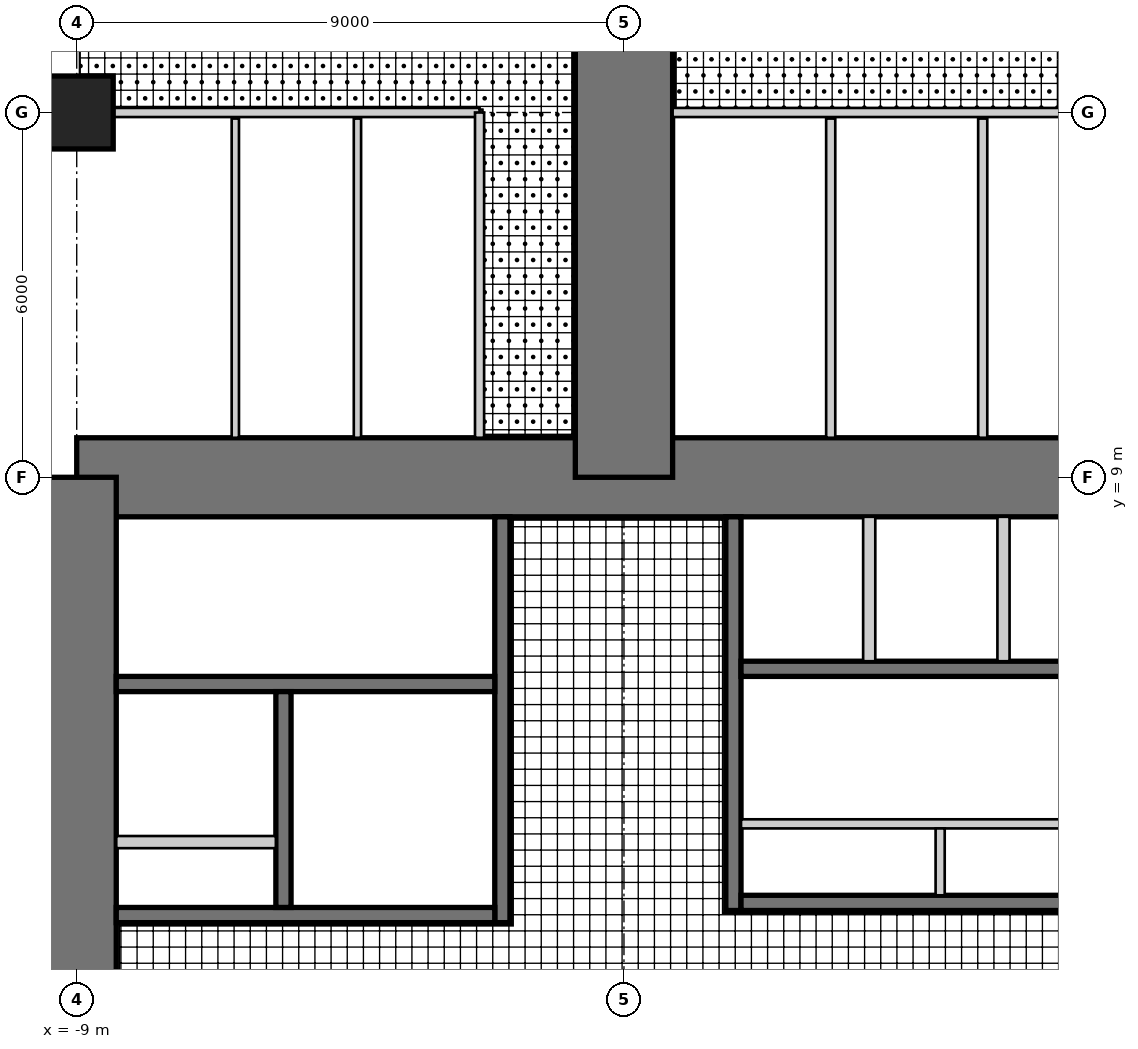
"""IFC4 building model, lengths in metres.
Left out: names, types, materials, properties, quantities, classifications, styles, units other than length and angle.
Written with IfcOpenShell. Run it as: python <this file> out.ifc"""

import sys

from ifc_helpers import new_model, si_unit, direction, frame, frame_2d, origin, origin_2d, place, context, subcontext, project, spatial, rectangle, extrude, element, fill, save


model = new_model("IFC4")
c1 = context("Model", 3, precision=1e-05, world=origin(), true_north=direction((0.0, 1.0)))
c2 = subcontext(c1, "Body", "Model", "MODEL_VIEW")
j1 = project(units=[si_unit("LENGTHUNIT", "METRE"), si_unit("PLANEANGLEUNIT", "RADIAN")], contexts=[c1])
p1 = place(None, origin())
s1 = spatial("IfcSite", under=j1, at=p1, CompositionType="ELEMENT")
p2 = place(p1, origin())
s2 = spatial("IfcBuilding", under=s1, at=p2, CompositionType="ELEMENT")
p3 = place(p2, frame((0.0, 0.0, 71.5)))
s3 = spatial("IfcBuildingStorey", under=s2, at=p3, CompositionType="ELEMENT", Elevation=71.5)
p4 = place(p3, frame((9.0, 9.0, 0.0), z_axis=(0.0, 0.0, 1.0), x_axis=(-1.0, 0.0, 0.0)))
e1 = element("IfcWall", 1, at=p4, inside=s3, PredefinedType="SHEAR", context=c2, shape_type="SweptSolid", body=[
    extrude(rectangle(XDim=18.0, YDim=1.3, at=frame_2d((9.0, 0.0))), origin(), (0.0, 0.0, 1.0), 4.0),
])
p5 = place(p4, frame((9.8, 0.0, 0.0)))
e2 = element("IfcOpeningElement", 2, at=p5, cuts=e1, PredefinedType="OPENING", context=c2, shape_type="SweptSolid", body=[
    extrude(rectangle(XDim=1.0, YDim=2.4, at=frame_2d((0.5, 1.2))), frame((0.0, 0.66, 0.0), z_axis=(0.0, -1.0, 0.0), x_axis=(1.0, 0.0, 0.0)), (0.0, 0.0, 1.0), 1.32),
])
p6 = place(p3, frame((-9.0, 9.0, 0.0), z_axis=(0.0, 0.0, 1.0), x_axis=(0.0, -1.0, 0.0)))
e3 = element("IfcWall", 3, at=p6, inside=s3, PredefinedType="SHEAR", context=c2, shape_type="SweptSolid", body=[
    extrude(rectangle(XDim=18.0, YDim=1.3, at=frame_2d((9.0, 0.0))), origin(), (0.0, 0.0, 1.0), 4.0),
])
p7 = place(p6, frame((9.8, 0.0, 0.0)))
e4 = element("IfcOpeningElement", 4, at=p7, cuts=e3, PredefinedType="OPENING", context=c2, shape_type="SweptSolid", body=[
    extrude(rectangle(XDim=1.0, YDim=2.4, at=frame_2d((0.5, 1.2))), frame((0.0, 0.66, 0.0), z_axis=(0.0, -1.0, 0.0), x_axis=(1.0, 0.0, 0.0)), (0.0, 0.0, 1.0), 1.32),
])
p8 = place(p3, frame((1.8, 1.875, 0.0), z_axis=(0.0, 0.0, 1.0), x_axis=(0.0, 1.0, 0.0)))
e5 = element("IfcWall", 5, at=p8, inside=s3, PredefinedType="SHEAR", context=c2, shape_type="SweptSolid", body=[
    extrude(rectangle(XDim=6.475, YDim=0.25, at=frame_2d((3.238, 0.0))), origin(), (0.0, 0.0, 1.0), 4.0),
])
p9 = place(p8, frame((1.875, 0.0, 0.0)))
e6 = element("IfcOpeningElement", 6, at=p9, cuts=e5, PredefinedType="OPENING", context=c2, shape_type="SweptSolid", body=[
    extrude(rectangle(XDim=1.6, YDim=2.4, at=frame_2d((0.8, 1.2))), frame((0.0, 0.135, 0.0), z_axis=(0.0, -1.0, 0.0), x_axis=(1.0, 0.0, 0.0)), (0.0, 0.0, 1.0), 0.27),
])
p10 = place(p3, frame((1.925, 2.0, 0.0), z_axis=(0.0, 0.0, 1.0), x_axis=(1.0, 0.0, 0.0)))
e7 = element("IfcWall", 7, at=p10, inside=s3, PredefinedType="SHEAR", context=c2, shape_type="SweptSolid", body=[
    extrude(rectangle(XDim=6.425, YDim=0.25, at=frame_2d((3.212, 0.0))), origin(), (0.0, 0.0, 1.0), 4.0),
])
p11 = place(p3, frame((1.925, 5.85, 0.0), z_axis=(0.0, 0.0, 1.0), x_axis=(1.0, 0.0, 0.0)))
e8 = element("IfcWall", 8, at=p11, inside=s3, PredefinedType="SHEAR", context=c2, shape_type="SweptSolid", body=[
    extrude(rectangle(XDim=6.425, YDim=0.25, at=frame_2d((3.212, 0.0))), origin(), (0.0, 0.0, 1.0), 4.0),
])
p12 = place(p11, frame((0.454, 0.0, 0.0)))
e9 = element("IfcOpeningElement", 9, at=p12, cuts=e8, PredefinedType="OPENING", context=c2, shape_type="SweptSolid", body=[
    extrude(rectangle(XDim=1.1, YDim=2.2, at=frame_2d((0.55, 1.1))), frame((0.0, 0.135, 0.0), z_axis=(0.0, -1.0, 0.0), x_axis=(1.0, 0.0, 0.0)), (0.0, 0.0, 1.0), 0.27),
])
p13 = place(p11, frame((2.663, 0.0, 0.0)))
e10 = element("IfcOpeningElement", 10, at=p13, cuts=e8, PredefinedType="OPENING", context=c2, shape_type="SweptSolid", body=[
    extrude(rectangle(XDim=1.1, YDim=2.2, at=frame_2d((0.55, 1.1))), frame((0.0, 0.135, 0.0), z_axis=(0.0, -1.0, 0.0), x_axis=(1.0, 0.0, 0.0)), (0.0, 0.0, 1.0), 0.27),
])
p14 = place(p11, frame((4.871, 0.0, 0.0)))
e11 = element("IfcOpeningElement", 11, at=p14, cuts=e8, PredefinedType="OPENING", context=c2, shape_type="SweptSolid", body=[
    extrude(rectangle(XDim=1.1, YDim=2.2, at=frame_2d((0.55, 1.1))), frame((0.0, 0.135, 0.0), z_axis=(0.0, -1.0, 0.0), x_axis=(1.0, 0.0, 0.0)), (0.0, 0.0, 1.0), 0.27),
])
p15 = place(p3, frame((1.925, 3.3, 0.0), z_axis=(0.0, 0.0, 1.0), x_axis=(1.0, 0.0, 0.0)))
e12 = element("IfcWall", 12, at=p15, inside=s3, PredefinedType="PARTITIONING", context=c2, shape_type="SweptSolid", body=[
    extrude(rectangle(XDim=6.425, YDim=0.15, at=frame_2d((3.212, 0.0))), origin(), (0.0, 0.0, 1.0), 4.0),
])
p16 = place(p15, frame((0.075, 0.0, 0.0)))
e13 = element("IfcOpeningElement", 13, at=p16, cuts=e12, PredefinedType="OPENING", context=c2, shape_type="SweptSolid", body=[
    extrude(rectangle(XDim=0.8, YDim=2.1, at=frame_2d((0.4, 1.05))), frame((0.0, 0.085, 0.0), z_axis=(0.0, -1.0, 0.0), x_axis=(1.0, 0.0, 0.0)), (0.0, 0.0, 1.0), 0.17),
])
p17 = place(p15, frame((3.675, 0.0, 0.0)))
e14 = element("IfcOpeningElement", 14, at=p17, cuts=e12, PredefinedType="OPENING", context=c2, shape_type="SweptSolid", body=[
    extrude(rectangle(XDim=0.8, YDim=2.1, at=frame_2d((0.4, 1.05))), frame((0.0, 0.085, 0.0), z_axis=(0.0, -1.0, 0.0), x_axis=(1.0, 0.0, 0.0)), (0.0, 0.0, 1.0), 0.17),
])
p18 = place(p3, frame((5.2, 2.125, 0.0), z_axis=(0.0, 0.0, 1.0), x_axis=(0.0, 1.0, 0.0)))
e15 = element("IfcWall", 15, at=p18, inside=s3, PredefinedType="PARTITIONING", context=c2, shape_type="SweptSolid", body=[
    extrude(rectangle(XDim=1.1, YDim=0.15, at=frame_2d((0.55, 0.0))), origin(), (0.0, 0.0, 1.0), 4.0),
])
for number, where, z_axis, x_axis in (
    (16, (4.033, 5.975, 0.0), (0.0, 0.0, 1.0), (0.0, 1.0, 0.0)),
    (17, (6.242, 5.975, 0.0), (0.0, 0.0, 1.0), (0.0, 1.0, 0.0)),
):
    element("IfcWall", number, at=place(p3, frame(where, z_axis=z_axis, x_axis=x_axis)), inside=s3, PredefinedType="PARTITIONING", context=c2, shape_type="SweptSolid", body=[
        extrude(rectangle(XDim=2.375, YDim=0.2, at=frame_2d((1.188, 0.0))), origin(), (0.0, 0.0, 1.0), 4.0),
    ])
p19 = place(p3, frame((-2.0, 1.675, 0.0), z_axis=(0.0, 0.0, 1.0), x_axis=(0.0, 1.0, 0.0)))
e18 = element("IfcWall", 18, at=p19, inside=s3, PredefinedType="SHEAR", context=c2, shape_type="SweptSolid", body=[
    extrude(rectangle(XDim=6.675, YDim=0.25, at=frame_2d((3.337, 0.0))), origin(), (0.0, 0.0, 1.0), 4.0),
])
p20 = place(p19, frame((0.725, 0.0, 0.0)))
e19 = element("IfcOpeningElement", 19, at=p20, cuts=e18, PredefinedType="OPENING", context=c2, shape_type="SweptSolid", body=[
    extrude(rectangle(XDim=1.0, YDim=2.1, at=frame_2d((0.5, 1.05))), frame((0.0, 0.135, 0.0), z_axis=(0.0, -1.0, 0.0), x_axis=(1.0, 0.0, 0.0)), (0.0, 0.0, 1.0), 0.27),
])
p21 = place(p3, frame((-2.125, 1.8, 0.0), z_axis=(0.0, 0.0, 1.0), x_axis=(-1.0, 0.0, 0.0)))
e20 = element("IfcWall", 20, at=p21, inside=s3, PredefinedType="SHEAR", context=c2, shape_type="SweptSolid", body=[
    extrude(rectangle(XDim=6.225, YDim=0.25, at=frame_2d((3.113, 0.0))), origin(), (0.0, 0.0, 1.0), 4.0),
])
p22 = place(p3, frame((-2.125, 5.6, 0.0), z_axis=(0.0, 0.0, 1.0), x_axis=(-1.0, 0.0, 0.0)))
e21 = element("IfcWall", 21, at=p22, inside=s3, PredefinedType="SHEAR", context=c2, shape_type="SweptSolid", body=[
    extrude(rectangle(XDim=6.225, YDim=0.25, at=frame_2d((3.113, 0.0))), origin(), (0.0, 0.0, 1.0), 4.0),
])
p23 = place(p22, frame((0.175, 0.0, 0.0)))
e22 = element("IfcOpeningElement", 22, at=p23, cuts=e21, PredefinedType="OPENING", context=c2, shape_type="SweptSolid", body=[
    extrude(rectangle(XDim=1.0, YDim=2.1, at=frame_2d((0.5, 1.05))), frame((0.0, 0.135, 0.0), z_axis=(0.0, -1.0, 0.0), x_axis=(1.0, 0.0, 0.0)), (0.0, 0.0, 1.0), 0.27),
])
p24 = place(p3, frame((-5.6, 1.925, 0.0), z_axis=(0.0, 0.0, 1.0), x_axis=(0.0, 1.0, 0.0)))
e23 = element("IfcWall", 23, at=p24, inside=s3, PredefinedType="SHEAR", context=c2, shape_type="SweptSolid", body=[
    extrude(rectangle(XDim=3.55, YDim=0.25, at=frame_2d((1.775, 0.0))), origin(), (0.0, 0.0, 1.0), 4.0),
])
p25 = place(p24, frame((1.525, 0.0, 0.0)))
e24 = element("IfcOpeningElement", 24, at=p25, cuts=e23, PredefinedType="OPENING", context=c2, shape_type="SweptSolid", body=[
    extrude(rectangle(XDim=1.1, YDim=2.2, at=frame_2d((0.55, 1.1))), frame((0.0, 0.135, 0.0), z_axis=(0.0, -1.0, 0.0), x_axis=(1.0, 0.0, 0.0)), (0.0, 0.0, 1.0), 0.27),
])
p26 = place(p24, frame((0.075, 0.0, 0.0)))
e25 = element("IfcOpeningElement", 25, at=p26, cuts=e23, PredefinedType="OPENING", context=c2, shape_type="SweptSolid", body=[
    extrude(rectangle(XDim=0.8, YDim=2.1, at=frame_2d((0.4, 1.05))), frame((0.0, 0.135, 0.0), z_axis=(0.0, -1.0, 0.0), x_axis=(1.0, 0.0, 0.0)), (0.0, 0.0, 1.0), 0.27),
])
p27 = place(p3, frame((-5.725, 3.0, 0.0), z_axis=(0.0, 0.0, 1.0), x_axis=(-1.0, 0.0, 0.0)))
e26 = element("IfcWall", 26, at=p27, inside=s3, PredefinedType="PARTITIONING", context=c2, shape_type="SweptSolid", body=[
    extrude(rectangle(XDim=2.625, YDim=0.2, at=frame_2d((1.312, 0.0))), origin(), (0.0, 0.0, 1.0), 4.0),
])
p28 = place(p3, frame((0.0, 9.0, 0.0), z_axis=(0.0, 0.0, 1.0), x_axis=(0.0, 1.0, 0.0)))
e27 = element("IfcWall", 27, at=p28, inside=s3, PredefinedType="SHEAR", context=c2, shape_type="SweptSolid", body=[
    extrude(rectangle(XDim=9.0, YDim=1.6, at=frame_2d((4.5, 0.0))), origin(), (0.0, 0.0, 1.0), 4.0),
])
p29 = place(p3, frame((-9.0, 15.0, 0.0), z_axis=(0.0, 0.0, 1.0), x_axis=(1.0, 0.0, 0.0)))
e28 = element("IfcColumn", 28, at=p29, inside=s3, PredefinedType="COLUMN", context=c2, shape_type="SweptSolid", body=[
    extrude(rectangle(XDim=1.2, YDim=1.2, at=origin_2d()), origin(), (0.0, 0.0, 1.0), 4.0),
])
p30 = place(p3, frame((-2.375, 15.0, 0.0), z_axis=(0.0, 0.0, 1.0), x_axis=(-1.0, 0.0, 0.0)))
e29 = element("IfcWall", 29, at=p30, inside=s3, PredefinedType="PARTITIONING", context=c2, shape_type="SweptSolid", body=[
    extrude(rectangle(XDim=6.025, YDim=0.15, at=frame_2d((3.012, 0.0))), origin(), (0.0, 0.0, 1.0), 2.95),
])
p31 = place(p30, frame((0.504, 0.0, 0.0)))
e30 = element("IfcOpeningElement", 30, at=p31, cuts=e29, PredefinedType="OPENING", context=c2, shape_type="SweptSolid", body=[
    extrude(rectangle(XDim=1.0, YDim=2.1, at=frame_2d((0.5, 1.05))), frame((0.0, 0.085, 0.0), z_axis=(0.0, -1.0, 0.0), x_axis=(1.0, 0.0, 0.0)), (0.0, 0.0, 1.0), 0.17),
])
p32 = place(p30, frame((2.512, 0.0, 0.0)))
e31 = element("IfcOpeningElement", 31, at=p32, cuts=e29, PredefinedType="OPENING", context=c2, shape_type="SweptSolid", body=[
    extrude(rectangle(XDim=1.0, YDim=2.1, at=frame_2d((0.5, 1.05))), frame((0.0, 0.085, 0.0), z_axis=(0.0, -1.0, 0.0), x_axis=(1.0, 0.0, 0.0)), (0.0, 0.0, 1.0), 0.17),
])
p33 = place(p30, frame((4.521, 0.0, 0.0)))
e32 = element("IfcOpeningElement", 32, at=p33, cuts=e29, PredefinedType="OPENING", context=c2, shape_type="SweptSolid", body=[
    extrude(rectangle(XDim=1.0, YDim=2.1, at=frame_2d((0.5, 1.05))), frame((0.0, 0.085, 0.0), z_axis=(0.0, -1.0, 0.0), x_axis=(1.0, 0.0, 0.0)), (0.0, 0.0, 1.0), 0.17),
])
p34 = place(p3, frame((-2.375, 9.65, 0.0), z_axis=(0.0, 0.0, 1.0), x_axis=(0.0, 1.0, 0.0)))
e33 = element("IfcWall", 33, at=p34, inside=s3, PredefinedType="PARTITIONING", context=c2, shape_type="SweptSolid", body=[
    extrude(rectangle(XDim=5.35, YDim=0.15, at=frame_2d((2.675, 0.0))), origin(), (0.0, 0.0, 1.0), 3.8),
])
for number, where, z_axis, x_axis in (
    (34, (-4.383, 9.65, 0.0), (0.0, 0.0, 1.0), (0.0, 1.0, 0.0)),
    (35, (-6.392, 9.65, 0.0), (0.0, 0.0, 1.0), (0.0, 1.0, 0.0)),
):
    element("IfcWall", number, at=place(p3, frame(where, z_axis=z_axis, x_axis=x_axis)), inside=s3, PredefinedType="PLUMBINGWALL", context=c2, shape_type="SweptSolid", body=[
        extrude(rectangle(XDim=5.25, YDim=0.12, at=frame_2d((2.625, 0.0))), origin(), (0.0, 0.0, 1.0), 3.8),
    ])
p35 = place(p3, frame((8.4, 15.0, 0.0), z_axis=(0.0, 0.0, 1.0), x_axis=(-1.0, 0.0, 0.0)))
e36 = element("IfcWall", 36, at=p35, inside=s3, PredefinedType="PARTITIONING", context=c2, shape_type="SweptSolid", body=[
    extrude(rectangle(XDim=7.6, YDim=0.15, at=frame_2d((3.8, 0.0))), origin(), (0.0, 0.0, 1.0), 2.95),
])
p36 = place(p35, frame((0.75, 0.0, 0.0)))
e37 = element("IfcOpeningElement", 37, at=p36, cuts=e36, PredefinedType="OPENING", context=c2, shape_type="SweptSolid", body=[
    extrude(rectangle(XDim=1.0, YDim=2.1, at=frame_2d((0.5, 1.05))), frame((0.0, 0.085, 0.0), z_axis=(0.0, -1.0, 0.0), x_axis=(1.0, 0.0, 0.0)), (0.0, 0.0, 1.0), 0.17),
])
p37 = place(p35, frame((3.25, 0.0, 0.0)))
e38 = element("IfcOpeningElement", 38, at=p37, cuts=e36, PredefinedType="OPENING", context=c2, shape_type="SweptSolid", body=[
    extrude(rectangle(XDim=1.0, YDim=2.1, at=frame_2d((0.5, 1.05))), frame((0.0, 0.085, 0.0), z_axis=(0.0, -1.0, 0.0), x_axis=(1.0, 0.0, 0.0)), (0.0, 0.0, 1.0), 0.17),
])
p38 = place(p35, frame((5.8, 0.0, 0.0)))
e39 = element("IfcOpeningElement", 39, at=p38, cuts=e36, PredefinedType="OPENING", context=c2, shape_type="SweptSolid", body=[
    extrude(rectangle(XDim=1.0, YDim=2.1, at=frame_2d((0.5, 1.05))), frame((0.0, 0.085, 0.0), z_axis=(0.0, -1.0, 0.0), x_axis=(1.0, 0.0, 0.0)), (0.0, 0.0, 1.0), 0.17),
])
p39 = place(p3, frame((3.4, 9.65, 0.0), z_axis=(0.0, 0.0, 1.0), x_axis=(0.0, 1.0, 0.0)))
e40 = element("IfcWall", 40, at=p39, inside=s3, PredefinedType="PARTITIONING", context=c2, shape_type="SweptSolid", body=[
    extrude(rectangle(XDim=5.25, YDim=0.15, at=frame_2d((2.625, 0.0))), origin(), (0.0, 0.0, 1.0), 3.8),
])
p40 = place(p3, frame((5.9, 9.65, 0.0), z_axis=(0.0, 0.0, 1.0), x_axis=(0.0, 1.0, 0.0)))
e41 = element("IfcWall", 41, at=p40, inside=s3, PredefinedType="PARTITIONING", context=c2, shape_type="SweptSolid", body=[
    extrude(rectangle(XDim=5.25, YDim=0.15, at=frame_2d((2.625, 0.0))), origin(), (0.0, 0.0, 1.0), 3.0),
])
p41 = place(p31, origin())
e42 = element("IfcDoor", 42, at=p41, inside=s3, OperationType="SINGLE_SWING_LEFT", PredefinedType="DOOR", context=c2, shape_type="SweptSolid", body=[
    extrude(rectangle(XDim=1.0, YDim=2.1, at=frame_2d((0.5, 1.05))), frame((0.0, 0.025, 0.0), z_axis=(0.0, -1.0, 0.0), x_axis=(1.0, 0.0, 0.0)), (0.0, 0.0, 1.0), 0.05),
])
fill(e30, e42)
p42 = place(p32, origin())
e43 = element("IfcDoor", 43, at=p42, inside=s3, OperationType="SINGLE_SWING_LEFT", PredefinedType="DOOR", context=c2, shape_type="SweptSolid", body=[
    extrude(rectangle(XDim=1.0, YDim=2.1, at=frame_2d((0.5, 1.05))), frame((0.0, 0.025, 0.0), z_axis=(0.0, -1.0, 0.0), x_axis=(1.0, 0.0, 0.0)), (0.0, 0.0, 1.0), 0.05),
])
fill(e31, e43)
p43 = place(p33, origin())
e44 = element("IfcDoor", 44, at=p43, inside=s3, OperationType="SINGLE_SWING_LEFT", PredefinedType="DOOR", context=c2, shape_type="SweptSolid", body=[
    extrude(rectangle(XDim=1.0, YDim=2.1, at=frame_2d((0.5, 1.05))), frame((0.0, 0.025, 0.0), z_axis=(0.0, -1.0, 0.0), x_axis=(1.0, 0.0, 0.0)), (0.0, 0.0, 1.0), 0.05),
])
fill(e32, e44)
p44 = place(p36, origin())
e45 = element("IfcDoor", 45, at=p44, inside=s3, OperationType="SINGLE_SWING_RIGHT", PredefinedType="DOOR", context=c2, shape_type="SweptSolid", body=[
    extrude(rectangle(XDim=1.0, YDim=2.1, at=frame_2d((0.5, 1.05))), frame((0.0, 0.025, 0.0), z_axis=(0.0, -1.0, 0.0), x_axis=(1.0, 0.0, 0.0)), (0.0, 0.0, 1.0), 0.05),
])
fill(e37, e45)
p45 = place(p37, origin())
e46 = element("IfcDoor", 46, at=p45, inside=s3, OperationType="SINGLE_SWING_LEFT", PredefinedType="DOOR", context=c2, shape_type="SweptSolid", body=[
    extrude(rectangle(XDim=1.0, YDim=2.1, at=frame_2d((0.5, 1.05))), frame((0.0, 0.025, 0.0), z_axis=(0.0, -1.0, 0.0), x_axis=(1.0, 0.0, 0.0)), (0.0, 0.0, 1.0), 0.05),
])
fill(e38, e46)
p46 = place(p38, origin())
e47 = element("IfcDoor", 47, at=p46, inside=s3, OperationType="SINGLE_SWING_LEFT", PredefinedType="DOOR", context=c2, shape_type="SweptSolid", body=[
    extrude(rectangle(XDim=1.0, YDim=2.1, at=frame_2d((0.5, 1.05))), frame((0.0, 0.025, 0.0), z_axis=(0.0, -1.0, 0.0), x_axis=(1.0, 0.0, 0.0)), (0.0, 0.0, 1.0), 0.05),
])
fill(e39, e47)
p47 = place(p5, frame((1.0, 0.0, 0.0), z_axis=(0.0, 0.0, 1.0), x_axis=(-1.0, 0.0, 0.0)))
e48 = element("IfcDoor", 48, at=p47, inside=s3, OperationType="SINGLE_SWING_RIGHT", PredefinedType="DOOR", context=c2, shape_type="SweptSolid", body=[
    extrude(rectangle(XDim=1.0, YDim=2.4, at=frame_2d((0.5, 1.2))), frame((0.0, -0.005, 0.0), z_axis=(0.0, -1.0, 0.0), x_axis=(1.0, 0.0, 0.0)), (0.0, 0.0, 1.0), 0.05),
])
fill(e2, e48)
p48 = place(p12, origin())
e49 = element("IfcDoor", 49, at=p48, inside=s3, OperationType="DOUBLE_DOOR_SLIDING", PredefinedType="DOOR", context=c2, shape_type="SweptSolid", body=[
    extrude(rectangle(XDim=1.1, YDim=2.2, at=frame_2d((0.55, 1.1))), frame((0.0, 0.025, 0.0), z_axis=(0.0, -1.0, 0.0), x_axis=(1.0, 0.0, 0.0)), (0.0, 0.0, 1.0), 0.05),
])
fill(e9, e49)
p49 = place(p13, origin())
e50 = element("IfcDoor", 50, at=p49, inside=s3, OperationType="DOUBLE_DOOR_SLIDING", PredefinedType="DOOR", context=c2, shape_type="SweptSolid", body=[
    extrude(rectangle(XDim=1.1, YDim=2.2, at=frame_2d((0.55, 1.1))), frame((0.0, 0.025, 0.0), z_axis=(0.0, -1.0, 0.0), x_axis=(1.0, 0.0, 0.0)), (0.0, 0.0, 1.0), 0.05),
])
fill(e10, e50)
p50 = place(p14, origin())
e51 = element("IfcDoor", 51, at=p50, inside=s3, OperationType="DOUBLE_DOOR_SLIDING", PredefinedType="DOOR", context=c2, shape_type="SweptSolid", body=[
    extrude(rectangle(XDim=1.1, YDim=2.2, at=frame_2d((0.55, 1.1))), frame((0.0, 0.025, 0.0), z_axis=(0.0, -1.0, 0.0), x_axis=(1.0, 0.0, 0.0)), (0.0, 0.0, 1.0), 0.05),
])
fill(e11, e51)
p51 = place(p9, origin())
e52 = element("IfcDoor", 52, at=p51, inside=s3, OperationType="DOUBLE_DOOR_DOUBLE_SWING", PredefinedType="DOOR", context=c2, shape_type="SweptSolid", body=[
    extrude(rectangle(XDim=1.6, YDim=2.4, at=frame_2d((0.8, 1.2))), frame((0.0, 0.025, 0.0), z_axis=(0.0, -1.0, 0.0), x_axis=(1.0, 0.0, 0.0)), (0.0, 0.0, 1.0), 0.05),
])
fill(e6, e52)
p52 = place(p16, frame((0.8, 0.0, 0.0), z_axis=(0.0, 0.0, 1.0), x_axis=(-1.0, 0.0, 0.0)))
e53 = element("IfcDoor", 53, at=p52, inside=s3, OperationType="SINGLE_SWING_RIGHT", PredefinedType="DOOR", context=c2, shape_type="SweptSolid", body=[
    extrude(rectangle(XDim=0.8, YDim=2.1, at=frame_2d((0.4, 1.05))), frame((0.0, 0.025, 0.0), z_axis=(0.0, -1.0, 0.0), x_axis=(1.0, 0.0, 0.0)), (0.0, 0.0, 1.0), 0.05),
])
fill(e13, e53)
p53 = place(p17, frame((0.8, 0.0, 0.0), z_axis=(0.0, 0.0, 1.0), x_axis=(-1.0, 0.0, 0.0)))
e54 = element("IfcDoor", 54, at=p53, inside=s3, OperationType="SINGLE_SWING_RIGHT", PredefinedType="DOOR", context=c2, shape_type="SweptSolid", body=[
    extrude(rectangle(XDim=0.8, YDim=2.1, at=frame_2d((0.4, 1.05))), frame((0.0, 0.025, 0.0), z_axis=(0.0, -1.0, 0.0), x_axis=(1.0, 0.0, 0.0)), (0.0, 0.0, 1.0), 0.05),
])
fill(e14, e54)
p54 = place(p20, origin())
e55 = element("IfcDoor", 55, at=p54, inside=s3, OperationType="SINGLE_SWING_LEFT", PredefinedType="DOOR", context=c2, shape_type="SweptSolid", body=[
    extrude(rectangle(XDim=1.0, YDim=2.1, at=frame_2d((0.5, 1.05))), frame((0.0, 0.025, 0.0), z_axis=(0.0, -1.0, 0.0), x_axis=(1.0, 0.0, 0.0)), (0.0, 0.0, 1.0), 0.05),
])
fill(e19, e55)
p55 = place(p23, frame((1.0, 0.0, 0.0), z_axis=(0.0, 0.0, 1.0), x_axis=(-1.0, 0.0, 0.0)))
e56 = element("IfcDoor", 56, at=p55, inside=s3, OperationType="SINGLE_SWING_RIGHT", PredefinedType="DOOR", context=c2, shape_type="SweptSolid", body=[
    extrude(rectangle(XDim=1.0, YDim=2.1, at=frame_2d((0.5, 1.05))), frame((0.0, 0.025, 0.0), z_axis=(0.0, -1.0, 0.0), x_axis=(1.0, 0.0, 0.0)), (0.0, 0.0, 1.0), 0.05),
])
fill(e22, e56)
p56 = place(p25, origin())
e57 = element("IfcDoor", 57, at=p56, inside=s3, OperationType="DOUBLE_DOOR_SLIDING", PredefinedType="DOOR", context=c2, shape_type="SweptSolid", body=[
    extrude(rectangle(XDim=1.1, YDim=2.2, at=frame_2d((0.55, 1.1))), frame((0.0, 0.025, 0.0), z_axis=(0.0, -1.0, 0.0), x_axis=(1.0, 0.0, 0.0)), (0.0, 0.0, 1.0), 0.05),
])
fill(e24, e57)
p57 = place(p26, origin())
e58 = element("IfcDoor", 58, at=p57, inside=s3, OperationType="SINGLE_SWING_LEFT", PredefinedType="DOOR", context=c2, shape_type="SweptSolid", body=[
    extrude(rectangle(XDim=0.8, YDim=2.1, at=frame_2d((0.4, 1.05))), frame((0.0, 0.025, 0.0), z_axis=(0.0, -1.0, 0.0), x_axis=(1.0, 0.0, 0.0)), (0.0, 0.0, 1.0), 0.05),
])
fill(e25, e58)
save(model, sys.argv[1])
